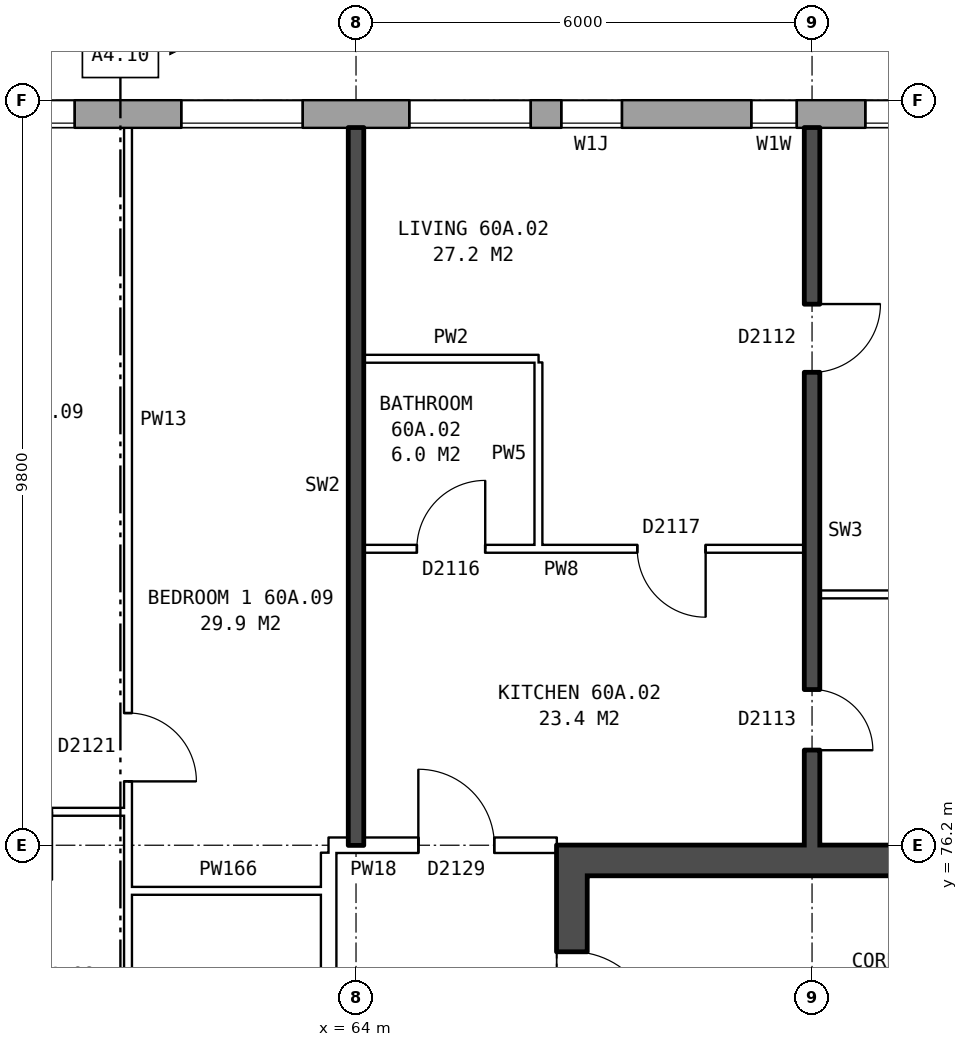
"""IFC4 building model, lengths in metres.
Left out: names, types, materials, properties, quantities, classifications, styles, units other than length and angle.
Written with IfcOpenShell. Run it as: python <this file> out.ifc"""

import sys

from ifc_helpers import new_model, si_unit, direction, frame, frame_2d, origin, place, context, subcontext, project, spatial, rectangle, extrude, element, fill, save


model = new_model("IFC4")
c1 = context("Model", 3, precision=1e-05, world=origin(), true_north=direction((0.0, 1.0)))
c2 = subcontext(c1, "Body", "Model", "MODEL_VIEW")
j1 = project(units=[si_unit("LENGTHUNIT", "METRE"), si_unit("PLANEANGLEUNIT", "RADIAN")], contexts=[c1])
p1 = place(None, origin())
s1 = spatial("IfcSite", under=j1, at=p1, CompositionType="ELEMENT")
p2 = place(p1, origin())
s2 = spatial("IfcBuilding", under=s1, at=p2, CompositionType="ELEMENT")
p3 = place(p2, frame((0.0, 0.0, 212.1)))
s3 = spatial("IfcBuildingStorey", under=s2, at=p3, CompositionType="ELEMENT", Elevation=212.1)
p4 = place(p3, frame((74.95, 85.82, 0.0), z_axis=(0.0, 0.0, 1.0), x_axis=(-1.0, 0.0, 0.0)))
e1 = element("IfcWall", 1, at=p4, inside=s3, PredefinedType="STANDARD", context=c2, shape_type="SweptSolid", body=[
    extrude(rectangle(XDim=39.875, YDim=0.36, at=frame_2d((19.938, 0.0))), origin(), (0.0, 0.0, 1.0), 2.85),
])
p5 = place(p4, frame((2.65, 0.0, 0.8)))
e2 = element("IfcOpeningElement", 2, at=p5, cuts=e1, PredefinedType="OPENING", context=c2, shape_type="SweptSolid", body=[
    extrude(rectangle(XDim=1.6, YDim=1.8, at=frame_2d((0.8, 0.9))), frame((0.0, 0.19, 0.0), z_axis=(0.0, -1.0, 0.0), x_axis=(1.0, 0.0, 0.0)), (0.0, 0.0, 1.0), 0.38),
])
p6 = place(p4, frame((5.15, 0.0, 1.5)))
e3 = element("IfcOpeningElement", 3, at=p6, cuts=e1, PredefinedType="OPENING", context=c2, shape_type="SweptSolid", body=[
    extrude(rectangle(XDim=0.6, YDim=0.9, at=frame_2d((0.3, 0.45))), frame((0.0, 0.19, 0.0), z_axis=(0.0, -1.0, 0.0), x_axis=(1.0, 0.0, 0.0)), (0.0, 0.0, 1.0), 0.38),
])
p7 = place(p4, frame((8.65, 0.0, 0.8)))
e4 = element("IfcOpeningElement", 4, at=p7, cuts=e1, PredefinedType="OPENING", context=c2, shape_type="SweptSolid", body=[
    extrude(rectangle(XDim=1.6, YDim=1.8, at=frame_2d((0.8, 0.9))), frame((0.0, 0.19, 0.0), z_axis=(0.0, -1.0, 0.0), x_axis=(1.0, 0.0, 0.0)), (0.0, 0.0, 1.0), 0.38),
])
p8 = place(p4, frame((11.65, 0.0, 0.8)))
e5 = element("IfcOpeningElement", 5, at=p8, cuts=e1, PredefinedType="OPENING", context=c2, shape_type="SweptSolid", body=[
    extrude(rectangle(XDim=1.6, YDim=1.8, at=frame_2d((0.8, 0.9))), frame((0.0, 0.19, 0.0), z_axis=(0.0, -1.0, 0.0), x_axis=(1.0, 0.0, 0.0)), (0.0, 0.0, 1.0), 0.38),
])
p9 = place(p4, frame((14.65, 0.0, 0.8)))
e6 = element("IfcOpeningElement", 6, at=p9, cuts=e1, PredefinedType="OPENING", context=c2, shape_type="SweptSolid", body=[
    extrude(rectangle(XDim=1.6, YDim=1.8, at=frame_2d((0.8, 0.9))), frame((0.0, 0.19, 0.0), z_axis=(0.0, -1.0, 0.0), x_axis=(1.0, 0.0, 0.0)), (0.0, 0.0, 1.0), 0.38),
])
p10 = place(p4, frame((17.65, 0.0, 0.8)))
e7 = element("IfcOpeningElement", 7, at=p10, cuts=e1, PredefinedType="OPENING", context=c2, shape_type="SweptSolid", body=[
    extrude(rectangle(XDim=1.6, YDim=1.8, at=frame_2d((0.8, 0.9))), frame((0.0, 0.19, 0.0), z_axis=(0.0, -1.0, 0.0), x_axis=(1.0, 0.0, 0.0)), (0.0, 0.0, 1.0), 0.38),
])
p11 = place(p4, frame((20.65, 0.0, 0.8)))
e8 = element("IfcOpeningElement", 8, at=p11, cuts=e1, PredefinedType="OPENING", context=c2, shape_type="SweptSolid", body=[
    extrude(rectangle(XDim=1.6, YDim=1.8, at=frame_2d((0.8, 0.9))), frame((0.0, 0.19, 0.0), z_axis=(0.0, -1.0, 0.0), x_axis=(1.0, 0.0, 0.0)), (0.0, 0.0, 1.0), 0.38),
])
p12 = place(p4, frame((23.65, 0.0, 0.8)))
e9 = element("IfcOpeningElement", 9, at=p12, cuts=e1, PredefinedType="OPENING", context=c2, shape_type="SweptSolid", body=[
    extrude(rectangle(XDim=1.6, YDim=1.8, at=frame_2d((0.8, 0.9))), frame((0.0, 0.19, 0.0), z_axis=(0.0, -1.0, 0.0), x_axis=(1.0, 0.0, 0.0)), (0.0, 0.0, 1.0), 0.38),
])
p13 = place(p4, frame((26.65, 0.0, 0.8)))
e10 = element("IfcOpeningElement", 10, at=p13, cuts=e1, PredefinedType="OPENING", context=c2, shape_type="SweptSolid", body=[
    extrude(rectangle(XDim=1.6, YDim=1.8, at=frame_2d((0.8, 0.9))), frame((0.0, 0.19, 0.0), z_axis=(0.0, -1.0, 0.0), x_axis=(1.0, 0.0, 0.0)), (0.0, 0.0, 1.0), 0.38),
])
p14 = place(p4, frame((29.65, 0.0, 0.8)))
e11 = element("IfcOpeningElement", 11, at=p14, cuts=e1, PredefinedType="OPENING", context=c2, shape_type="SweptSolid", body=[
    extrude(rectangle(XDim=1.6, YDim=1.8, at=frame_2d((0.8, 0.9))), frame((0.0, 0.19, 0.0), z_axis=(0.0, -1.0, 0.0), x_axis=(1.0, 0.0, 0.0)), (0.0, 0.0, 1.0), 0.38),
])
p15 = place(p4, frame((32.65, 0.0, 0.8)))
e12 = element("IfcOpeningElement", 12, at=p15, cuts=e1, PredefinedType="OPENING", context=c2, shape_type="SweptSolid", body=[
    extrude(rectangle(XDim=1.6, YDim=1.8, at=frame_2d((0.8, 0.9))), frame((0.0, 0.19, 0.0), z_axis=(0.0, -1.0, 0.0), x_axis=(1.0, 0.0, 0.0)), (0.0, 0.0, 1.0), 0.38),
])
p16 = place(p4, frame((36.35, 0.0, 1.1)))
e13 = element("IfcOpeningElement", 13, at=p16, cuts=e1, PredefinedType="OPENING", context=c2, shape_type="SweptSolid", body=[
    extrude(rectangle(XDim=0.8, YDim=1.5, at=frame_2d((0.4, 0.75))), frame((0.0, 0.19, 0.0), z_axis=(0.0, -1.0, 0.0), x_axis=(1.0, 0.0, 0.0)), (0.0, 0.0, 1.0), 0.38),
])
p17 = place(p4, frame((7.45, 0.0, 0.8)))
e14 = element("IfcOpeningElement", 14, at=p17, cuts=e1, PredefinedType="OPENING", context=c2, shape_type="SweptSolid", body=[
    extrude(rectangle(XDim=0.8, YDim=1.5, at=frame_2d((0.4, 0.75))), frame((0.0, 0.19, 0.0), z_axis=(0.0, -1.0, 0.0), x_axis=(1.0, 0.0, 0.0)), (0.0, 0.0, 1.0), 0.38),
])
p18 = place(p4, frame((37.45, 0.0, 0.8)))
e15 = element("IfcOpeningElement", 15, at=p18, cuts=e1, PredefinedType="OPENING", context=c2, shape_type="SweptSolid", body=[
    extrude(rectangle(XDim=1.4, YDim=1.8, at=frame_2d((0.7, 0.9))), frame((0.0, 0.19, 0.0), z_axis=(0.0, -1.0, 0.0), x_axis=(1.0, 0.0, 0.0)), (0.0, 0.0, 1.0), 0.38),
])
p19 = place(p3, frame((66.84, 63.8, 0.0), z_axis=(0.0, 0.0, 1.0), x_axis=(0.0, 1.0, 0.0)))
e16 = element("IfcWall", 16, at=p19, inside=s3, PredefinedType="SHEAR", context=c2, shape_type="SweptSolid", body=[
    extrude(rectangle(XDim=12.4, YDim=0.4, at=frame_2d((6.2, 0.0))), origin(), (0.0, 0.0, 1.0), 2.85),
])
p20 = place(p19, frame((1.325, 0.0, 0.0)))
e17 = element("IfcOpeningElement", 17, at=p20, cuts=e16, PredefinedType="OPENING", context=c2, shape_type="SweptSolid", body=[
    extrude(rectangle(XDim=1.1, YDim=2.1, at=frame_2d((0.55, 1.05))), frame((0.0, 0.21, 0.0), z_axis=(0.0, -1.0, 0.0), x_axis=(1.0, 0.0, 0.0)), (0.0, 0.0, 1.0), 0.42),
])
p21 = place(p19, frame((3.6, 0.0, 0.0)))
e18 = element("IfcOpeningElement", 18, at=p21, cuts=e16, PredefinedType="OPENING", context=c2, shape_type="SweptSolid", body=[
    extrude(rectangle(XDim=1.1, YDim=2.1, at=frame_2d((0.55, 1.05))), frame((0.0, 0.21, 0.0), z_axis=(0.0, -1.0, 0.0), x_axis=(1.0, 0.0, 0.0)), (0.0, 0.0, 1.0), 0.42),
])
p22 = place(p19, frame((5.8, 0.0, 0.0)))
e19 = element("IfcOpeningElement", 19, at=p22, cuts=e16, PredefinedType="OPENING", context=c2, shape_type="SweptSolid", body=[
    extrude(rectangle(XDim=1.1, YDim=2.1, at=frame_2d((0.55, 1.05))), frame((0.0, 0.21, 0.0), z_axis=(0.0, -1.0, 0.0), x_axis=(1.0, 0.0, 0.0)), (0.0, 0.0, 1.0), 0.42),
])
p23 = place(p19, frame((8.0, 0.0, 0.0)))
e20 = element("IfcOpeningElement", 20, at=p23, cuts=e16, PredefinedType="OPENING", context=c2, shape_type="SweptSolid", body=[
    extrude(rectangle(XDim=1.1, YDim=2.1, at=frame_2d((0.55, 1.05))), frame((0.0, 0.21, 0.0), z_axis=(0.0, -1.0, 0.0), x_axis=(1.0, 0.0, 0.0)), (0.0, 0.0, 1.0), 0.42),
])
p24 = place(p19, frame((9.9, 0.0, 0.0)))
e21 = element("IfcOpeningElement", 21, at=p24, cuts=e16, PredefinedType="OPENING", context=c2, shape_type="SweptSolid", body=[
    extrude(rectangle(XDim=1.1, YDim=2.1, at=frame_2d((0.55, 1.05))), frame((0.0, 0.21, 0.0), z_axis=(0.0, -1.0, 0.0), x_axis=(1.0, 0.0, 0.0)), (0.0, 0.0, 1.0), 0.42),
])
p25 = place(p3, frame((67.04, 76.0, 0.0), z_axis=(0.0, 0.0, 1.0), x_axis=(1.0, 0.0, 0.0)))
e22 = element("IfcWall", 22, at=p25, inside=s3, PredefinedType="SHEAR", context=c2, shape_type="SweptSolid", body=[
    extrude(rectangle(XDim=8.2, YDim=0.4, at=frame_2d((4.1, 0.0))), origin(), (0.0, 0.0, 1.0), 2.85),
])
p26 = place(p3, frame((63.64, 63.9, 0.0), z_axis=(0.0, 0.0, 1.0), x_axis=(0.0, 1.0, 0.0)))
e23 = element("IfcWall", 23, at=p26, inside=s3, PredefinedType="PARTITIONING", context=c2, shape_type="SweptSolid", body=[
    extrude(rectangle(XDim=12.2, YDim=0.2, at=frame_2d((6.1, 0.0))), origin(), (0.0, 0.0, 1.0), 2.85),
])
p27 = place(p26, frame((5.1, 0.0, 0.0)))
e24 = element("IfcOpeningElement", 24, at=p27, cuts=e23, PredefinedType="OPENING", context=c2, shape_type="SweptSolid", body=[
    extrude(rectangle(XDim=2.0, YDim=2.1, at=frame_2d((1.0, 1.05))), frame((0.0, 0.11, 0.0), z_axis=(0.0, -1.0, 0.0), x_axis=(1.0, 0.0, 0.0)), (0.0, 0.0, 1.0), 0.22),
])
p28 = place(p3, frame((61.0, 75.6, 0.0), z_axis=(0.0, 0.0, 1.0), x_axis=(1.0, 0.0, 0.0)))
e25 = element("IfcWall", 25, at=p28, inside=s3, PredefinedType="PARTITIONING", context=c2, shape_type="SweptSolid", body=[
    extrude(rectangle(XDim=2.64, YDim=0.1, at=frame_2d((1.32, 0.0))), origin(), (0.0, 0.0, 1.0), 2.85),
])
p29 = place(p3, frame((63.64, 76.2, 0.0), z_axis=(0.0, 0.0, 1.0), x_axis=(1.0, 0.0, 0.0)))
e26 = element("IfcWall", 26, at=p29, inside=s3, PredefinedType="PARTITIONING", context=c2, shape_type="SweptSolid", body=[
    extrude(rectangle(XDim=3.0, YDim=0.2, at=frame_2d((1.5, 0.0))), origin(), (0.0, 0.0, 1.0), 2.85),
])
p30 = place(p29, frame((1.18, 0.0, 0.0)))
e27 = element("IfcOpeningElement", 27, at=p30, cuts=e26, PredefinedType="OPENING", context=c2, shape_type="SweptSolid", body=[
    extrude(rectangle(XDim=1.0, YDim=2.1, at=frame_2d((0.5, 1.05))), frame((0.0, 0.11, 0.0), z_axis=(0.0, -1.0, 0.0), x_axis=(1.0, 0.0, 0.0)), (0.0, 0.0, 1.0), 0.22),
])
p31 = place(p3, frame((58.1, 76.64, 0.0), z_axis=(0.0, 0.0, 1.0), x_axis=(1.0, 0.0, 0.0)))
e28 = element("IfcWall", 28, at=p31, inside=s3, PredefinedType="PARTITIONING", context=c2, shape_type="SweptSolid", body=[
    extrude(rectangle(XDim=2.9, YDim=0.1, at=frame_2d((1.45, 0.0))), origin(), (0.0, 0.0, 1.0), 2.85),
])
p32 = place(p31, frame((1.0, 0.0, 0.0)))
e29 = element("IfcOpeningElement", 29, at=p32, cuts=e28, PredefinedType="OPENING", context=c2, shape_type="SweptSolid", body=[
    extrude(rectangle(XDim=0.9, YDim=2.1, at=frame_2d((0.45, 1.05))), frame((0.0, 0.06, 0.0), z_axis=(0.0, -1.0, 0.0), x_axis=(1.0, 0.0, 0.0)), (0.0, 0.0, 1.0), 0.12),
])
p33 = place(p3, frame((70.1, 79.5, 0.0), z_axis=(0.0, 0.0, 1.0), x_axis=(1.0, 0.0, 0.0)))
e30 = element("IfcWall", 30, at=p33, inside=s3, PredefinedType="PARTITIONING", context=c2, shape_type="SweptSolid", body=[
    extrude(rectangle(XDim=5.8, YDim=0.1, at=frame_2d((2.9, 0.0))), origin(), (0.0, 0.0, 1.0), 2.85),
])
p34 = place(p3, frame((64.1, 80.1, 0.0), z_axis=(0.0, 0.0, 1.0), x_axis=(1.0, 0.0, 0.0)))
e31 = element("IfcWall", 31, at=p34, inside=s3, PredefinedType="PARTITIONING", context=c2, shape_type="SweptSolid", body=[
    extrude(rectangle(XDim=5.8, YDim=0.1, at=frame_2d((2.9, 0.0))), origin(), (0.0, 0.0, 1.0), 2.85),
])
p35 = place(p34, frame((3.6, 0.0, 0.0)))
e32 = element("IfcOpeningElement", 32, at=p35, cuts=e31, PredefinedType="OPENING", context=c2, shape_type="SweptSolid", body=[
    extrude(rectangle(XDim=0.9, YDim=2.1, at=frame_2d((0.45, 1.05))), frame((0.0, 0.06, 0.0), z_axis=(0.0, -1.0, 0.0), x_axis=(1.0, 0.0, 0.0)), (0.0, 0.0, 1.0), 0.12),
])
p36 = place(p34, frame((0.7, 0.0, 0.0)))
e33 = element("IfcOpeningElement", 33, at=p36, cuts=e31, PredefinedType="OPENING", context=c2, shape_type="SweptSolid", body=[
    extrude(rectangle(XDim=0.9, YDim=2.1, at=frame_2d((0.45, 1.05))), frame((0.0, 0.06, 0.0), z_axis=(0.0, -1.0, 0.0), x_axis=(1.0, 0.0, 0.0)), (0.0, 0.0, 1.0), 0.12),
])
p37 = place(p3, frame((64.1, 82.6, 0.0), z_axis=(0.0, 0.0, 1.0), x_axis=(1.0, 0.0, 0.0)))
e34 = element("IfcWall", 34, at=p37, inside=s3, PredefinedType="PARTITIONING", context=c2, shape_type="SweptSolid", body=[
    extrude(rectangle(XDim=2.3, YDim=0.1, at=frame_2d((1.15, 0.0))), origin(), (0.0, 0.0, 1.0), 2.85),
])
p38 = place(p3, frame((61.0, 71.3, 0.0), z_axis=(0.0, 0.0, 1.0), x_axis=(0.0, 1.0, 0.0)))
e35 = element("IfcWall", 35, at=p38, inside=s3, PredefinedType="PARTITIONING", context=c2, shape_type="SweptSolid", body=[
    extrude(rectangle(XDim=14.34, YDim=0.1, at=frame_2d((7.17, 0.0))), origin(), (0.0, 0.0, 1.0), 2.85),
])
p39 = place(p38, frame((5.74, 0.0, 0.0)))
e36 = element("IfcOpeningElement", 36, at=p39, cuts=e35, PredefinedType="OPENING", context=c2, shape_type="SweptSolid", body=[
    extrude(rectangle(XDim=0.9, YDim=2.1, at=frame_2d((0.45, 1.05))), frame((0.0, 0.06, 0.0), z_axis=(0.0, -1.0, 0.0), x_axis=(1.0, 0.0, 0.0)), (0.0, 0.0, 1.0), 0.12),
])
p40 = place(p38, frame((0.4, 0.0, 0.0)))
e37 = element("IfcOpeningElement", 37, at=p40, cuts=e35, PredefinedType="OPENING", context=c2, shape_type="SweptSolid", body=[
    extrude(rectangle(XDim=0.9, YDim=2.1, at=frame_2d((0.45, 1.05))), frame((0.0, 0.06, 0.0), z_axis=(0.0, -1.0, 0.0), x_axis=(1.0, 0.0, 0.0)), (0.0, 0.0, 1.0), 0.12),
])
p41 = place(p3, frame((64.0, 76.2, 0.0), z_axis=(0.0, 0.0, 1.0), x_axis=(0.0, 1.0, 0.0)))
e38 = element("IfcWall", 38, at=p41, inside=s3, PredefinedType="SOLIDWALL", context=c2, shape_type="SweptSolid", body=[
    extrude(rectangle(XDim=9.44, YDim=0.2, at=frame_2d((4.72, 0.0))), origin(), (0.0, 0.0, 1.0), 2.85),
])
p42 = place(p3, frame((66.4, 80.15, 0.0), z_axis=(0.0, 0.0, 1.0), x_axis=(0.0, 1.0, 0.0)))
e39 = element("IfcWall", 39, at=p42, inside=s3, PredefinedType="PARTITIONING", context=c2, shape_type="SweptSolid", body=[
    extrude(rectangle(XDim=2.4, YDim=0.1, at=frame_2d((1.2, 0.0))), origin(), (0.0, 0.0, 1.0), 2.85),
])
p43 = place(p3, frame((70.0, 76.2, 0.0), z_axis=(0.0, 0.0, 1.0), x_axis=(0.0, 1.0, 0.0)))
e40 = element("IfcWall", 40, at=p43, inside=s3, PredefinedType="SOLIDWALL", context=c2, shape_type="SweptSolid", body=[
    extrude(rectangle(XDim=9.44, YDim=0.2, at=frame_2d((4.72, 0.0))), origin(), (0.0, 0.0, 1.0), 2.85),
])
p44 = place(p43, frame((6.22, 0.0, 0.0)))
e41 = element("IfcOpeningElement", 41, at=p44, cuts=e40, PredefinedType="OPENING", context=c2, shape_type="SweptSolid", body=[
    extrude(rectangle(XDim=0.9, YDim=2.1, at=frame_2d((0.45, 1.05))), frame((0.0, 0.11, 0.0), z_axis=(0.0, -1.0, 0.0), x_axis=(1.0, 0.0, 0.0)), (0.0, 0.0, 1.0), 0.22),
])
p45 = place(p43, frame((1.25, 0.0, 0.0)))
e42 = element("IfcOpeningElement", 42, at=p45, cuts=e40, PredefinedType="OPENING", context=c2, shape_type="SweptSolid", body=[
    extrude(rectangle(XDim=0.8, YDim=2.1, at=frame_2d((0.4, 1.05))), frame((0.0, 0.11, 0.0), z_axis=(0.0, -1.0, 0.0), x_axis=(1.0, 0.0, 0.0)), (0.0, 0.0, 1.0), 0.22),
])
p46 = place(p5, origin())
e43 = element("IfcWindow", 43, at=p46, inside=s3, PartitioningType="SINGLE_PANEL", PredefinedType="WINDOW", context=c2, shape_type="SweptSolid", body=[
    extrude(rectangle(XDim=1.6, YDim=1.8, at=frame_2d((0.8, 0.9))), frame((0.0, 0.15, 0.0), z_axis=(0.0, -1.0, 0.0), x_axis=(1.0, 0.0, 0.0)), (0.0, 0.0, 1.0), 0.06),
])
fill(e2, e43)
p47 = place(p6, origin())
e44 = element("IfcWindow", 44, at=p47, inside=s3, PartitioningType="SINGLE_PANEL", PredefinedType="WINDOW", context=c2, shape_type="SweptSolid", body=[
    extrude(rectangle(XDim=0.6, YDim=0.9, at=frame_2d((0.3, 0.45))), frame((0.0, 0.15, 0.0), z_axis=(0.0, -1.0, 0.0), x_axis=(1.0, 0.0, 0.0)), (0.0, 0.0, 1.0), 0.06),
])
fill(e3, e44)
p48 = place(p7, origin())
e45 = element("IfcWindow", 45, at=p48, inside=s3, PartitioningType="SINGLE_PANEL", PredefinedType="WINDOW", context=c2, shape_type="SweptSolid", body=[
    extrude(rectangle(XDim=1.6, YDim=1.8, at=frame_2d((0.8, 0.9))), frame((0.0, 0.15, 0.0), z_axis=(0.0, -1.0, 0.0), x_axis=(1.0, 0.0, 0.0)), (0.0, 0.0, 1.0), 0.06),
])
fill(e4, e45)
p49 = place(p8, origin())
e46 = element("IfcWindow", 46, at=p49, inside=s3, PartitioningType="SINGLE_PANEL", PredefinedType="WINDOW", context=c2, shape_type="SweptSolid", body=[
    extrude(rectangle(XDim=1.6, YDim=1.8, at=frame_2d((0.8, 0.9))), frame((0.0, 0.15, 0.0), z_axis=(0.0, -1.0, 0.0), x_axis=(1.0, 0.0, 0.0)), (0.0, 0.0, 1.0), 0.06),
])
fill(e5, e46)
p50 = place(p9, origin())
e47 = element("IfcWindow", 47, at=p50, inside=s3, PartitioningType="SINGLE_PANEL", PredefinedType="WINDOW", context=c2, shape_type="SweptSolid", body=[
    extrude(rectangle(XDim=1.6, YDim=1.8, at=frame_2d((0.8, 0.9))), frame((0.0, 0.15, 0.0), z_axis=(0.0, -1.0, 0.0), x_axis=(1.0, 0.0, 0.0)), (0.0, 0.0, 1.0), 0.06),
])
fill(e6, e47)
p51 = place(p24, frame((1.1, 0.0, 0.0), z_axis=(0.0, 0.0, 1.0), x_axis=(-1.0, 0.0, 0.0)))
e48 = element("IfcDoor", 48, at=p51, inside=s3, OperationType="SINGLE_SWING_RIGHT", PredefinedType="DOOR", context=c2, shape_type="SweptSolid", body=[
    extrude(rectangle(XDim=1.1, YDim=2.1, at=frame_2d((0.55, 1.05))), frame((0.0, 0.185, 0.0), z_axis=(0.0, -1.0, 0.0), x_axis=(1.0, 0.0, 0.0)), (0.0, 0.0, 1.0), 0.05),
])
fill(e21, e48)
p52 = place(p44, frame((0.9, 0.0, 0.0), z_axis=(0.0, 0.0, 1.0), x_axis=(-1.0, 0.0, 0.0)))
e49 = element("IfcDoor", 49, at=p52, inside=s3, OperationType="SINGLE_SWING_LEFT", PredefinedType="DOOR", context=c2, shape_type="SweptSolid", body=[
    extrude(rectangle(XDim=0.9, YDim=2.1, at=frame_2d((0.45, 1.05))), frame((0.0, 0.025, 0.0), z_axis=(0.0, -1.0, 0.0), x_axis=(1.0, 0.0, 0.0)), (0.0, 0.0, 1.0), 0.05),
])
fill(e41, e49)
p53 = place(p30, origin())
e50 = element("IfcDoor", 50, at=p53, inside=s3, OperationType="SINGLE_SWING_LEFT", PredefinedType="DOOR", context=c2, shape_type="SweptSolid", body=[
    extrude(rectangle(XDim=1.0, YDim=2.1, at=frame_2d((0.5, 1.05))), frame((0.0, 0.025, 0.0), z_axis=(0.0, -1.0, 0.0), x_axis=(1.0, 0.0, 0.0)), (0.0, 0.0, 1.0), 0.05),
])
fill(e27, e50)
p54 = place(p35, frame((0.9, 0.0, 0.0), z_axis=(0.0, 0.0, 1.0), x_axis=(-1.0, 0.0, 0.0)))
e51 = element("IfcDoor", 51, at=p54, inside=s3, OperationType="SINGLE_SWING_LEFT", PredefinedType="DOOR", context=c2, shape_type="SweptSolid", body=[
    extrude(rectangle(XDim=0.9, YDim=2.1, at=frame_2d((0.45, 1.05))), frame((0.0, 0.025, 0.0), z_axis=(0.0, -1.0, 0.0), x_axis=(1.0, 0.0, 0.0)), (0.0, 0.0, 1.0), 0.05),
])
fill(e32, e51)
p55 = place(p45, frame((0.8, 0.0, 0.0), z_axis=(0.0, 0.0, 1.0), x_axis=(-1.0, 0.0, 0.0)))
e52 = element("IfcDoor", 52, at=p55, inside=s3, OperationType="SINGLE_SWING_RIGHT", PredefinedType="DOOR", context=c2, shape_type="SweptSolid", body=[
    extrude(rectangle(XDim=0.8, YDim=2.1, at=frame_2d((0.4, 1.05))), frame((0.0, 0.025, 0.0), z_axis=(0.0, -1.0, 0.0), x_axis=(1.0, 0.0, 0.0)), (0.0, 0.0, 1.0), 0.05),
])
fill(e42, e52)
p56 = place(p36, origin())
e53 = element("IfcDoor", 53, at=p56, inside=s3, OperationType="SINGLE_SWING_RIGHT", PredefinedType="DOOR", context=c2, shape_type="SweptSolid", body=[
    extrude(rectangle(XDim=0.9, YDim=2.1, at=frame_2d((0.45, 1.05))), frame((0.0, 0.025, 0.0), z_axis=(0.0, -1.0, 0.0), x_axis=(1.0, 0.0, 0.0)), (0.0, 0.0, 1.0), 0.05),
])
fill(e33, e53)
p57 = place(p39, frame((0.9, 0.0, 0.0), z_axis=(0.0, 0.0, 1.0), x_axis=(-1.0, 0.0, 0.0)))
e54 = element("IfcDoor", 54, at=p57, inside=s3, OperationType="SINGLE_SWING_RIGHT", PredefinedType="DOOR", context=c2, shape_type="SweptSolid", body=[
    extrude(rectangle(XDim=0.9, YDim=2.1, at=frame_2d((0.45, 1.05))), frame((0.0, 0.025, 0.0), z_axis=(0.0, -1.0, 0.0), x_axis=(1.0, 0.0, 0.0)), (0.0, 0.0, 1.0), 0.05),
])
fill(e36, e54)
p58 = place(p17, origin())
e55 = element("IfcWindow", 55, at=p58, inside=s3, PartitioningType="SINGLE_PANEL", PredefinedType="WINDOW", context=c2, shape_type="SweptSolid", body=[
    extrude(rectangle(XDim=0.8, YDim=1.5, at=frame_2d((0.4, 0.75))), frame((0.0, 0.15, 0.0), z_axis=(0.0, -1.0, 0.0), x_axis=(1.0, 0.0, 0.0)), (0.0, 0.0, 1.0), 0.06),
])
fill(e14, e55)
save(model, sys.argv[1])
